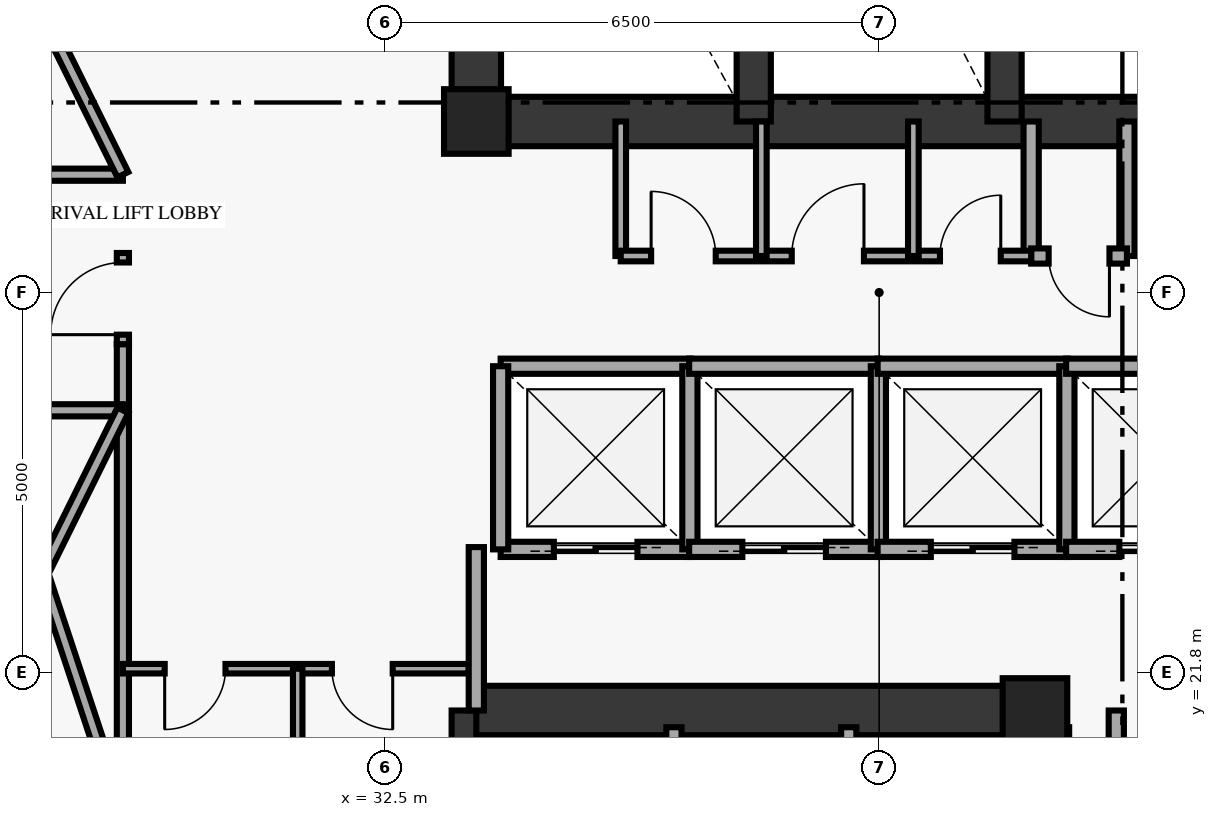
"""IFC4 building model, lengths in metres.
Left out: names, types, materials, properties, quantities, classifications, styles, units other than length and angle.
Written with IfcOpenShell. Run it as: python <this file> out.ifc"""

import sys

from ifc_helpers import new_model, si_unit, direction, frame, frame_2d, origin, origin_2d, place, context, subcontext, project, spatial, rectangle, extrude, element, fill, save


model = new_model("IFC4")
c1 = context("Model", 3, precision=1e-05, world=origin(), true_north=direction((0.0, 1.0)))
c2 = subcontext(c1, "Body", "Model", "MODEL_VIEW")
j1 = project(units=[si_unit("LENGTHUNIT", "METRE"), si_unit("PLANEANGLEUNIT", "RADIAN")], contexts=[c1])
p1 = place(None, origin())
s1 = spatial("IfcSite", under=j1, at=p1, CompositionType="ELEMENT")
p2 = place(p1, origin())
s2 = spatial("IfcBuilding", under=s1, at=p2, CompositionType="ELEMENT")
p3 = place(p2, frame((0.0, 0.0, 203.15)))
s3 = spatial("IfcBuildingStorey", under=s2, at=p3, CompositionType="ELEMENT", Elevation=203.15)
for number, where, z_axis, x_axis in (
    (1, (41.05, 21.3, 0.0), (0.0, 0.0, 1.0), (1.0, 0.0, 0.0)),
    (2, (33.7, 29.05, 0.0), (0.0, 0.0, 1.0), (1.0, 0.0, 0.0)),
):
    element("IfcColumn", number, at=place(p3, frame(where, z_axis=z_axis, x_axis=x_axis)), inside=s3, PredefinedType="PILASTER", context=c2, shape_type="SweptSolid", body=[
        extrude(rectangle(XDim=0.85, YDim=0.85, at=origin_2d()), origin(), (0.0, 0.0, 1.0), 4.76),
    ])
p4 = place(p3, frame((33.7, 29.05, 0.0), z_axis=(0.0, 0.0, 1.0), x_axis=(0.0, 1.0, 0.0)))
e3 = element("IfcWall", 3, at=p4, inside=s3, PredefinedType="SHEAR", context=c2, shape_type="SweptSolid", body=[
    extrude(rectangle(XDim=8.35, YDim=0.65, at=frame_2d((4.175, 0.0))), origin(), (0.0, 0.0, 1.0), 4.76),
])
p5 = place(p3, frame((33.7, 18.35, 0.0), z_axis=(0.0, 0.0, 1.0), x_axis=(0.0, 1.0, 0.0)))
e4 = element("IfcWall", 4, at=p5, inside=s3, PredefinedType="SHEAR", context=c2, shape_type="SweptSolid", body=[
    extrude(rectangle(XDim=2.95, YDim=0.65, at=frame_2d((1.475, 0.0))), origin(), (0.0, 0.0, 1.0), 4.76),
])
p6 = place(p3, frame((33.7, 29.05, 0.0), z_axis=(0.0, 0.0, 1.0), x_axis=(1.0, 0.0, 0.0)))
e5 = element("IfcWall", 5, at=p6, inside=s3, PredefinedType="SHEAR", context=c2, shape_type="SweptSolid", body=[
    extrude(rectangle(XDim=10.6, YDim=0.65, at=frame_2d((5.3, 0.0))), origin(), (0.0, 0.0, 1.0), 4.76),
])
p7 = place(p3, frame((33.7, 21.3, 0.0), z_axis=(0.0, 0.0, 1.0), x_axis=(1.0, 0.0, 0.0)))
e6 = element("IfcWall", 6, at=p7, inside=s3, PredefinedType="SHEAR", context=c2, shape_type="SweptSolid", body=[
    extrude(rectangle(XDim=7.55, YDim=0.65, at=frame_2d((3.775, 0.0))), origin(), (0.0, 0.0, 1.0), 4.76),
])
for number, where, z_axis, x_axis in (
    (7, (37.35, 29.05, 0.0), (0.0, 0.0, 1.0), (0.0, 1.0, 0.0)),
    (8, (40.65, 29.05, 0.0), (0.0, 0.0, 1.0), (0.0, 1.0, 0.0)),
):
    element("IfcWall", number, at=place(p3, frame(where, z_axis=z_axis, x_axis=x_axis)), inside=s3, PredefinedType="SHEAR", context=c2, shape_type="SweptSolid", body=[
        extrude(rectangle(XDim=8.35, YDim=0.45, at=frame_2d((4.175, 0.0))), origin(), (0.0, 0.0, 1.0), 4.76),
    ])
p8 = place(p3, frame((35.6, 27.28, 0.0), z_axis=(0.0, 0.0, 1.0), x_axis=(0.0, 1.0, 0.0)))
e9 = element("IfcWall", 9, at=p8, inside=s3, PredefinedType="PARTITIONING", context=c2, shape_type="SweptSolid", body=[
    extrude(rectangle(XDim=1.77, YDim=0.14, at=frame_2d((0.885, 0.0))), origin(), (0.0, 0.0, 1.0), 4.76),
])
for number, where, z_axis, x_axis in (
    (10, (41.0, 27.28, 0.0), (0.0, 0.0, 1.0), (0.0, 1.0, 0.0)),
    (11, (42.26, 27.28, 0.0), (0.0, 0.0, 1.0), (0.0, 1.0, 0.0)),
):
    element("IfcWall", number, at=place(p3, frame(where, z_axis=z_axis, x_axis=x_axis)), inside=s3, PredefinedType="SOLIDWALL", context=c2, shape_type="SweptSolid", body=[
        extrude(rectangle(XDim=1.77, YDim=0.2, at=frame_2d((0.885, 0.0))), origin(), (0.0, 0.0, 1.0), 4.76),
    ])
p9 = place(p3, frame((41.0, 27.28, 0.0), z_axis=(0.0, 0.0, 1.0), x_axis=(1.0, 0.0, 0.0)))
e12 = element("IfcWall", 12, at=p9, inside=s3, PredefinedType="SOLIDWALL", context=c2, shape_type="SweptSolid", body=[
    extrude(rectangle(XDim=1.26, YDim=0.2, at=frame_2d((0.63, 0.0))), origin(), (0.0, 0.0, 1.0), 4.76),
])
p10 = place(p9, frame((0.23, 0.0, 0.0)))
e13 = element("IfcOpeningElement", 13, at=p10, cuts=e12, PredefinedType="OPENING", context=c2, shape_type="SweptSolid", body=[
    extrude(rectangle(XDim=0.8, YDim=2.05, at=frame_2d((0.4, 1.025))), frame((0.0, 0.11, 0.0), z_axis=(0.0, -1.0, 0.0), x_axis=(1.0, 0.0, 0.0)), (0.0, 0.0, 1.0), 0.22),
])
p11 = place(p3, frame((34.02, 23.42, 0.0), z_axis=(0.0, 0.0, 1.0), x_axis=(1.0, 0.0, 0.0)))
e14 = element("IfcWall", 14, at=p11, inside=s3, PredefinedType="SOLIDWALL", context=c2, shape_type="SweptSolid", body=[
    extrude(rectangle(XDim=2.5, YDim=0.2, at=frame_2d((1.25, 0.0))), origin(), (0.0, 0.0, 1.0), 4.76),
])
p12 = place(p11, frame((0.7, 0.0, 0.0)))
e15 = element("IfcOpeningElement", 15, at=p12, cuts=e14, PredefinedType="OPENING", context=c2, shape_type="SweptSolid", body=[
    extrude(rectangle(XDim=1.1, YDim=2.15, at=frame_2d((0.55, 1.075))), frame((0.0, 0.11, 0.0), z_axis=(0.0, -1.0, 0.0), x_axis=(1.0, 0.0, 0.0)), (0.0, 0.0, 1.0), 0.22),
])
p13 = place(p3, frame((34.02, 25.83, 0.0), z_axis=(0.0, 0.0, 1.0), x_axis=(1.0, 0.0, 0.0)))
e16 = element("IfcWall", 16, at=p13, inside=s3, PredefinedType="SOLIDWALL", context=c2, shape_type="SweptSolid", body=[
    extrude(rectangle(XDim=2.5, YDim=0.2, at=frame_2d((1.25, 0.0))), origin(), (0.0, 0.0, 1.0), 4.76),
])
for number, where, z_axis, x_axis in (
    (17, (34.02, 23.42, 0.0), (0.0, 0.0, 1.0), (0.0, 1.0, 0.0)),
    (18, (36.51, 23.42, 0.0), (0.0, 0.0, 1.0), (0.0, 1.0, 0.0)),
):
    element("IfcWall", number, at=place(p3, frame(where, z_axis=z_axis, x_axis=x_axis)), inside=s3, PredefinedType="SOLIDWALL", context=c2, shape_type="SweptSolid", body=[
        extrude(rectangle(XDim=2.41, YDim=0.2, at=frame_2d((1.205, 0.0))), origin(), (0.0, 0.0, 1.0), 4.76),
    ])
p14 = place(p3, frame((36.5, 23.42, 0.0), z_axis=(0.0, 0.0, 1.0), x_axis=(1.0, 0.0, 0.0)))
e19 = element("IfcWall", 19, at=p14, inside=s3, PredefinedType="SOLIDWALL", context=c2, shape_type="SweptSolid", body=[
    extrude(rectangle(XDim=2.5, YDim=0.2, at=frame_2d((1.25, 0.0))), origin(), (0.0, 0.0, 1.0), 4.76),
])
p15 = place(p14, frame((0.7, 0.0, 0.0)))
e20 = element("IfcOpeningElement", 20, at=p15, cuts=e19, PredefinedType="OPENING", context=c2, shape_type="SweptSolid", body=[
    extrude(rectangle(XDim=1.1, YDim=2.15, at=frame_2d((0.55, 1.075))), frame((0.0, 0.11, 0.0), z_axis=(0.0, -1.0, 0.0), x_axis=(1.0, 0.0, 0.0)), (0.0, 0.0, 1.0), 0.22),
])
p16 = place(p3, frame((36.5, 25.83, 0.0), z_axis=(0.0, 0.0, 1.0), x_axis=(1.0, 0.0, 0.0)))
e21 = element("IfcWall", 21, at=p16, inside=s3, PredefinedType="SOLIDWALL", context=c2, shape_type="SweptSolid", body=[
    extrude(rectangle(XDim=2.5, YDim=0.2, at=frame_2d((1.25, 0.0))), origin(), (0.0, 0.0, 1.0), 4.76),
])
p17 = place(p3, frame((38.99, 23.42, 0.0), z_axis=(0.0, 0.0, 1.0), x_axis=(0.0, 1.0, 0.0)))
e22 = element("IfcWall", 22, at=p17, inside=s3, PredefinedType="SOLIDWALL", context=c2, shape_type="SweptSolid", body=[
    extrude(rectangle(XDim=2.41, YDim=0.2, at=frame_2d((1.205, 0.0))), origin(), (0.0, 0.0, 1.0), 4.76),
])
p18 = place(p3, frame((38.98, 23.42, 0.0), z_axis=(0.0, 0.0, 1.0), x_axis=(1.0, 0.0, 0.0)))
e23 = element("IfcWall", 23, at=p18, inside=s3, PredefinedType="SOLIDWALL", context=c2, shape_type="SweptSolid", body=[
    extrude(rectangle(XDim=2.5, YDim=0.2, at=frame_2d((1.25, 0.0))), origin(), (0.0, 0.0, 1.0), 4.76),
])
p19 = place(p18, frame((0.7, 0.0, 0.0)))
e24 = element("IfcOpeningElement", 24, at=p19, cuts=e23, PredefinedType="OPENING", context=c2, shape_type="SweptSolid", body=[
    extrude(rectangle(XDim=1.1, YDim=2.15, at=frame_2d((0.55, 1.075))), frame((0.0, 0.11, 0.0), z_axis=(0.0, -1.0, 0.0), x_axis=(1.0, 0.0, 0.0)), (0.0, 0.0, 1.0), 0.22),
])
p20 = place(p3, frame((38.98, 25.83, 0.0), z_axis=(0.0, 0.0, 1.0), x_axis=(1.0, 0.0, 0.0)))
e25 = element("IfcWall", 25, at=p20, inside=s3, PredefinedType="SOLIDWALL", context=c2, shape_type="SweptSolid", body=[
    extrude(rectangle(XDim=2.5, YDim=0.2, at=frame_2d((1.25, 0.0))), origin(), (0.0, 0.0, 1.0), 4.76),
])
p21 = place(p3, frame((41.47, 23.42, 0.0), z_axis=(0.0, 0.0, 1.0), x_axis=(0.0, 1.0, 0.0)))
e26 = element("IfcWall", 26, at=p21, inside=s3, PredefinedType="SOLIDWALL", context=c2, shape_type="SweptSolid", body=[
    extrude(rectangle(XDim=2.41, YDim=0.2, at=frame_2d((1.205, 0.0))), origin(), (0.0, 0.0, 1.0), 4.76),
])
p22 = place(p3, frame((41.46, 23.42, 0.0), z_axis=(0.0, 0.0, 1.0), x_axis=(1.0, 0.0, 0.0)))
e27 = element("IfcWall", 27, at=p22, inside=s3, PredefinedType="SOLIDWALL", context=c2, shape_type="SweptSolid", body=[
    extrude(rectangle(XDim=2.5, YDim=0.2, at=frame_2d((1.25, 0.0))), origin(), (0.0, 0.0, 1.0), 4.76),
])
p23 = place(p22, frame((0.7, 0.0, 0.0)))
e28 = element("IfcOpeningElement", 28, at=p23, cuts=e27, PredefinedType="OPENING", context=c2, shape_type="SweptSolid", body=[
    extrude(rectangle(XDim=1.1, YDim=2.15, at=frame_2d((0.55, 1.075))), frame((0.0, 0.11, 0.0), z_axis=(0.0, -1.0, 0.0), x_axis=(1.0, 0.0, 0.0)), (0.0, 0.0, 1.0), 0.22),
])
p24 = place(p3, frame((41.46, 25.83, 0.0), z_axis=(0.0, 0.0, 1.0), x_axis=(1.0, 0.0, 0.0)))
e29 = element("IfcWall", 29, at=p24, inside=s3, PredefinedType="SOLIDWALL", context=c2, shape_type="SweptSolid", body=[
    extrude(rectangle(XDim=2.5, YDim=0.2, at=frame_2d((1.25, 0.0))), origin(), (0.0, 0.0, 1.0), 4.76),
])
for number, where, z_axis, x_axis in (
    (30, (36.3, 18.37, 0.0), (0.0, 0.0, 1.0), (0.0, 1.0, 0.0)),
    (31, (38.6, 18.37, 0.0), (0.0, 0.0, 1.0), (0.0, 1.0, 0.0)),
    (32, (41.4, 18.37, 0.0), (0.0, 0.0, 1.0), (0.0, 1.0, 0.0)),
):
    element("IfcWall", number, at=place(p3, frame(where, z_axis=z_axis, x_axis=x_axis)), inside=s3, PredefinedType="SOLIDWALL", context=c2, shape_type="SweptSolid", body=[
        extrude(rectangle(XDim=2.71, YDim=0.2, at=frame_2d((1.355, 0.0))), origin(), (0.0, 0.0, 1.0), 4.76),
    ])
p25 = place(p3, frame((29.05, 19.05, 0.0), z_axis=(0.0, 0.0, 1.0), x_axis=(0.0, 1.0, 0.0)))
e33 = element("IfcWall", 33, at=p25, inside=s3, PredefinedType="PARTITIONING", context=c2, shape_type="SweptSolid", body=[
    extrude(rectangle(XDim=7.07, YDim=0.16, at=frame_2d((3.535, 0.0))), origin(), (0.0, 0.0, 1.0), 4.76),
])
p26 = place(p3, frame((33.6, 21.85, 0.0), z_axis=(0.0, 0.0, 1.0), x_axis=(-1.0, 0.0, 0.0)))
e34 = element("IfcWall", 34, at=p26, inside=s3, PredefinedType="PARTITIONING", context=c2, shape_type="SweptSolid", body=[
    extrude(rectangle(XDim=4.55, YDim=0.125, at=frame_2d((2.275, 0.0))), origin(), (0.0, 0.0, 1.0), 4.76),
])
p27 = place(p26, frame((3.2, 0.0, 0.0)))
e35 = element("IfcOpeningElement", 35, at=p27, cuts=e34, PredefinedType="OPENING", context=c2, shape_type="SweptSolid", body=[
    extrude(rectangle(XDim=0.8, YDim=2.05, at=frame_2d((0.4, 1.025))), frame((0.0, 0.073, 0.0), z_axis=(0.0, -1.0, 0.0), x_axis=(1.0, 0.0, 0.0)), (0.0, 0.0, 1.0), 0.145),
])
p28 = place(p26, frame((1.0, 0.0, 0.0)))
e36 = element("IfcOpeningElement", 36, at=p28, cuts=e34, PredefinedType="OPENING", context=c2, shape_type="SweptSolid", body=[
    extrude(rectangle(XDim=0.8, YDim=2.05, at=frame_2d((0.4, 1.025))), frame((0.0, 0.073, 0.0), z_axis=(0.0, -1.0, 0.0), x_axis=(1.0, 0.0, 0.0)), (0.0, 0.0, 1.0), 0.145),
])
p29 = place(p3, frame((31.35, 19.05, 0.0), z_axis=(0.0, 0.0, 1.0), x_axis=(0.0, 1.0, 0.0)))
e37 = element("IfcWall", 37, at=p29, inside=s3, PredefinedType="PARTITIONING", context=c2, shape_type="SweptSolid", body=[
    extrude(rectangle(XDim=2.8, YDim=0.125, at=frame_2d((1.4, 0.0))), origin(), (0.0, 0.0, 1.0), 4.76),
])
p30 = place(p3, frame((33.7, 21.3, 0.0), z_axis=(0.0, 0.0, 1.0), x_axis=(0.0, 1.0, 0.0)))
e38 = element("IfcWall", 38, at=p30, inside=s3, PredefinedType="SOLIDWALL", context=c2, shape_type="SweptSolid", body=[
    extrude(rectangle(XDim=2.15, YDim=0.2, at=frame_2d((1.075, 0.0))), origin(), (0.0, 0.0, 1.0), 4.145),
])
p31 = place(p3, frame((42.12, 18.35, 0.0), z_axis=(0.0, 0.0, 1.0), x_axis=(0.0, 1.0, 0.0)))
e39 = element("IfcWall", 39, at=p31, inside=s3, PredefinedType="SOLIDWALL", context=c2, shape_type="SweptSolid", body=[
    extrude(rectangle(XDim=2.95, YDim=0.2, at=frame_2d((1.475, 0.0))), origin(), (0.0, 0.0, 1.0), 4.76),
])
p32 = place(p31, frame((0.2, 0.0, 0.0)))
e40 = element("IfcOpeningElement", 40, at=p32, cuts=e39, PredefinedType="OPENING", context=c2, shape_type="SweptSolid", body=[
    extrude(rectangle(XDim=0.8, YDim=2.05, at=frame_2d((0.4, 1.025))), frame((0.0, 0.11, 0.0), z_axis=(0.0, -1.0, 0.0), x_axis=(1.0, 0.0, 0.0)), (0.0, 0.0, 1.0), 0.22),
])
p33 = place(p3, frame((29.05, 26.12, 0.0), z_axis=(0.0, 0.0, 1.0), x_axis=(0.0, 1.0, 0.0)))
e41 = element("IfcWall", 41, at=p33, inside=s3, PredefinedType="PARTITIONING", context=c2, shape_type="SweptSolid", body=[
    extrude(rectangle(XDim=1.2, YDim=0.16, at=frame_2d((0.6, 0.0))), origin(), (0.0, 0.0, 1.0), 4.76),
])
p34 = place(p33, frame((0.125, 0.0, 0.0)))
e42 = element("IfcOpeningElement", 42, at=p34, cuts=e41, PredefinedType="OPENING", context=c2, shape_type="SweptSolid", body=[
    extrude(rectangle(XDim=0.95, YDim=2.15, at=frame_2d((0.475, 1.075))), frame((0.0, 0.09, 0.0), z_axis=(0.0, -1.0, 0.0), x_axis=(1.0, 0.0, 0.0)), (0.0, 0.0, 1.0), 0.18),
])
p35 = place(p3, frame((35.6, 27.28, 0.0), z_axis=(0.0, 0.0, 1.0), x_axis=(1.0, 0.0, 0.0)))
e43 = element("IfcWall", 43, at=p35, inside=s3, PredefinedType="PARTITIONING", context=c2, shape_type="SweptSolid", body=[
    extrude(rectangle(XDim=5.4, YDim=0.14, at=frame_2d((2.7, 0.0))), origin(), (0.0, 0.0, 1.0), 4.76),
])
p36 = place(p35, frame((0.4, 0.0, 0.0)))
e44 = element("IfcOpeningElement", 44, at=p36, cuts=e43, PredefinedType="OPENING", context=c2, shape_type="SweptSolid", body=[
    extrude(rectangle(XDim=0.85, YDim=2.1, at=frame_2d((0.425, 1.05))), frame((0.0, 0.08, 0.0), z_axis=(0.0, -1.0, 0.0), x_axis=(1.0, 0.0, 0.0)), (0.0, 0.0, 1.0), 0.16),
])
p37 = place(p35, frame((2.25, 0.0, 0.0)))
e45 = element("IfcOpeningElement", 45, at=p37, cuts=e43, PredefinedType="OPENING", context=c2, shape_type="SweptSolid", body=[
    extrude(rectangle(XDim=0.95, YDim=2.1, at=frame_2d((0.475, 1.05))), frame((0.0, 0.08, 0.0), z_axis=(0.0, -1.0, 0.0), x_axis=(1.0, 0.0, 0.0)), (0.0, 0.0, 1.0), 0.16),
])
p38 = place(p35, frame((4.2, 0.0, 0.0)))
e46 = element("IfcOpeningElement", 46, at=p38, cuts=e43, PredefinedType="OPENING", context=c2, shape_type="SweptSolid", body=[
    extrude(rectangle(XDim=0.8, YDim=2.05, at=frame_2d((0.4, 1.025))), frame((0.0, 0.08, 0.0), z_axis=(0.0, -1.0, 0.0), x_axis=(1.0, 0.0, 0.0)), (0.0, 0.0, 1.0), 0.16),
])
for number, where, z_axis, x_axis in (
    (47, (37.45, 27.28, 0.0), (0.0, 0.0, 1.0), (0.0, 1.0, 0.0)),
    (48, (39.45, 27.28, 0.0), (0.0, 0.0, 1.0), (0.0, 1.0, 0.0)),
):
    element("IfcWall", number, at=place(p3, frame(where, z_axis=z_axis, x_axis=x_axis)), inside=s3, PredefinedType="PARTITIONING", context=c2, shape_type="SweptSolid", body=[
        extrude(rectangle(XDim=1.77, YDim=0.14, at=frame_2d((0.885, 0.0))), origin(), (0.0, 0.0, 1.0), 4.76),
    ])
p39 = place(p3, frame((27.988, 23.104, 0.0), z_axis=(0.0, 0.0, 1.0), x_axis=(0.313965508334, -0.949434389295, 0.0)))
e49 = element("IfcWall", 49, at=p39, inside=s3, PredefinedType="PARTITIONING", context=c2, shape_type="SweptSolid", body=[
    extrude(rectangle(XDim=3.627, YDim=0.16, at=frame_2d((1.814, 0.0))), origin(), (0.0, 0.0, 1.0), 4.76),
])
p40 = place(p3, frame((26.25, 28.35, 0.0), z_axis=(0.0, 0.0, 1.0), x_axis=(1.0, 0.0, 0.0)))
e50 = element("IfcWall", 50, at=p40, inside=s3, PredefinedType="PARTITIONING", context=c2, shape_type="SweptSolid", body=[
    extrude(rectangle(XDim=2.8, YDim=0.16, at=frame_2d((1.4, 0.0))), origin(), (0.0, 0.0, 1.0), 3.9),
])
p41 = place(p40, frame((0.2, 0.0, 0.0)))
e51 = element("IfcOpeningElement", 51, at=p41, cuts=e50, PredefinedType="OPENING", context=c2, shape_type="SweptSolid", body=[
    extrude(rectangle(XDim=1.6, YDim=2.2, at=frame_2d((0.8, 1.1))), frame((0.0, 0.09, 0.0), z_axis=(0.0, -1.0, 0.0), x_axis=(1.0, 0.0, 0.0)), (0.0, 0.0, 1.0), 0.18),
])
p42 = place(p3, frame((26.25, 25.25, 0.0), z_axis=(0.0, 0.0, 1.0), x_axis=(1.0, 0.0, 0.0)))
e52 = element("IfcWall", 52, at=p42, inside=s3, PredefinedType="PARTITIONING", context=c2, shape_type="SweptSolid", body=[
    extrude(rectangle(XDim=2.8, YDim=0.16, at=frame_2d((1.4, 0.0))), origin(), (0.0, 0.0, 1.0), 4.76),
])
p43 = place(p42, frame((0.2, 0.0, 0.0)))
e53 = element("IfcOpeningElement", 53, at=p43, cuts=e52, PredefinedType="OPENING", context=c2, shape_type="SweptSolid", body=[
    extrude(rectangle(XDim=1.6, YDim=2.2, at=frame_2d((0.8, 1.1))), frame((0.0, 0.09, 0.0), z_axis=(0.0, -1.0, 0.0), x_axis=(1.0, 0.0, 0.0)), (0.0, 0.0, 1.0), 0.18),
])
for number, where, z_axis, x_axis in (
    (54, (27.988, 30.496, 0.0), (0.0, 0.0, 1.0), (0.444, -0.896, 0.0)),
    (55, (27.988, 23.104, 0.0), (0.0, 0.0, 1.0), (0.444, 0.896, 0.0)),
):
    element("IfcWall", number, at=place(p3, frame(where, z_axis=z_axis, x_axis=x_axis)), inside=s3, PredefinedType="PARTITIONING", context=c2, shape_type="SweptSolid", body=[
        extrude(rectangle(XDim=2.394, YDim=0.16, at=frame_2d((1.197, 0.0))), origin(), (0.0, 0.0, 1.0), 4.76),
    ])
p44 = place(p10, origin())
e56 = element("IfcDoor", 56, at=p44, inside=s3, OperationType="SINGLE_SWING_RIGHT", PredefinedType="DOOR", context=c2, shape_type="SweptSolid", body=[
    extrude(rectangle(XDim=0.8, YDim=2.05, at=frame_2d((0.4, 1.025))), frame((0.0, 0.025, 0.0), z_axis=(0.0, -1.0, 0.0), x_axis=(1.0, 0.0, 0.0)), (0.0, 0.0, 1.0), 0.05),
])
fill(e13, e56)
p45 = place(p12, origin())
e57 = element("IfcDoor", 57, at=p45, inside=s3, OperationType="DOUBLE_DOOR_SLIDING", PredefinedType="DOOR", context=c2, shape_type="SweptSolid", body=[
    extrude(rectangle(XDim=1.1, YDim=2.15, at=frame_2d((0.55, 1.075))), frame((0.0, 0.025, 0.0), z_axis=(0.0, -1.0, 0.0), x_axis=(1.0, 0.0, 0.0)), (0.0, 0.0, 1.0), 0.05),
])
fill(e15, e57)
p46 = place(p15, origin())
e58 = element("IfcDoor", 58, at=p46, inside=s3, OperationType="DOUBLE_DOOR_SLIDING", PredefinedType="DOOR", context=c2, shape_type="SweptSolid", body=[
    extrude(rectangle(XDim=1.1, YDim=2.15, at=frame_2d((0.55, 1.075))), frame((0.0, 0.025, 0.0), z_axis=(0.0, -1.0, 0.0), x_axis=(1.0, 0.0, 0.0)), (0.0, 0.0, 1.0), 0.05),
])
fill(e20, e58)
p47 = place(p19, origin())
e59 = element("IfcDoor", 59, at=p47, inside=s3, OperationType="DOUBLE_DOOR_SLIDING", PredefinedType="DOOR", context=c2, shape_type="SweptSolid", body=[
    extrude(rectangle(XDim=1.1, YDim=2.15, at=frame_2d((0.55, 1.075))), frame((0.0, 0.025, 0.0), z_axis=(0.0, -1.0, 0.0), x_axis=(1.0, 0.0, 0.0)), (0.0, 0.0, 1.0), 0.05),
])
fill(e24, e59)
p48 = place(p23, origin())
e60 = element("IfcDoor", 60, at=p48, inside=s3, OperationType="DOUBLE_DOOR_SLIDING", PredefinedType="DOOR", context=c2, shape_type="SweptSolid", body=[
    extrude(rectangle(XDim=1.1, YDim=2.15, at=frame_2d((0.55, 1.075))), frame((0.0, 0.025, 0.0), z_axis=(0.0, -1.0, 0.0), x_axis=(1.0, 0.0, 0.0)), (0.0, 0.0, 1.0), 0.05),
])
fill(e28, e60)
p49 = place(p27, origin())
e61 = element("IfcDoor", 61, at=p49, inside=s3, OperationType="SINGLE_SWING_RIGHT", PredefinedType="DOOR", context=c2, shape_type="SweptSolid", body=[
    extrude(rectangle(XDim=0.8, YDim=2.05, at=frame_2d((0.4, 1.025))), frame((0.0, 0.025, 0.0), z_axis=(0.0, -1.0, 0.0), x_axis=(1.0, 0.0, 0.0)), (0.0, 0.0, 1.0), 0.05),
])
fill(e35, e61)
p50 = place(p28, origin())
e62 = element("IfcDoor", 62, at=p50, inside=s3, OperationType="SINGLE_SWING_LEFT", PredefinedType="DOOR", context=c2, shape_type="SweptSolid", body=[
    extrude(rectangle(XDim=0.8, YDim=2.05, at=frame_2d((0.4, 1.025))), frame((0.0, 0.025, 0.0), z_axis=(0.0, -1.0, 0.0), x_axis=(1.0, 0.0, 0.0)), (0.0, 0.0, 1.0), 0.05),
])
fill(e36, e62)
p51 = place(p34, origin())
e63 = element("IfcDoor", 63, at=p51, inside=s3, OperationType="SINGLE_SWING_RIGHT", PredefinedType="DOOR", context=c2, shape_type="SweptSolid", body=[
    extrude(rectangle(XDim=0.95, YDim=2.15, at=frame_2d((0.475, 1.075))), frame((0.0, 0.025, 0.0), z_axis=(0.0, -1.0, 0.0), x_axis=(1.0, 0.0, 0.0)), (0.0, 0.0, 1.0), 0.05),
])
fill(e42, e63)
p52 = place(p36, origin())
e64 = element("IfcDoor", 64, at=p52, inside=s3, OperationType="SINGLE_SWING_LEFT", PredefinedType="DOOR", context=c2, shape_type="SweptSolid", body=[
    extrude(rectangle(XDim=0.85, YDim=2.1, at=frame_2d((0.425, 1.05))), frame((0.0, 0.025, 0.0), z_axis=(0.0, -1.0, 0.0), x_axis=(1.0, 0.0, 0.0)), (0.0, 0.0, 1.0), 0.05),
])
fill(e44, e64)
p53 = place(p37, origin())
e65 = element("IfcDoor", 65, at=p53, inside=s3, OperationType="SINGLE_SWING_RIGHT", PredefinedType="DOOR", context=c2, shape_type="SweptSolid", body=[
    extrude(rectangle(XDim=0.95, YDim=2.1, at=frame_2d((0.475, 1.05))), frame((0.0, 0.025, 0.0), z_axis=(0.0, -1.0, 0.0), x_axis=(1.0, 0.0, 0.0)), (0.0, 0.0, 1.0), 0.05),
])
fill(e45, e65)
p54 = place(p38, origin())
e66 = element("IfcDoor", 66, at=p54, inside=s3, OperationType="SINGLE_SWING_RIGHT", PredefinedType="DOOR", context=c2, shape_type="SweptSolid", body=[
    extrude(rectangle(XDim=0.8, YDim=2.05, at=frame_2d((0.4, 1.025))), frame((0.0, 0.025, 0.0), z_axis=(0.0, -1.0, 0.0), x_axis=(1.0, 0.0, 0.0)), (0.0, 0.0, 1.0), 0.05),
])
fill(e46, e66)
save(model, sys.argv[1])
